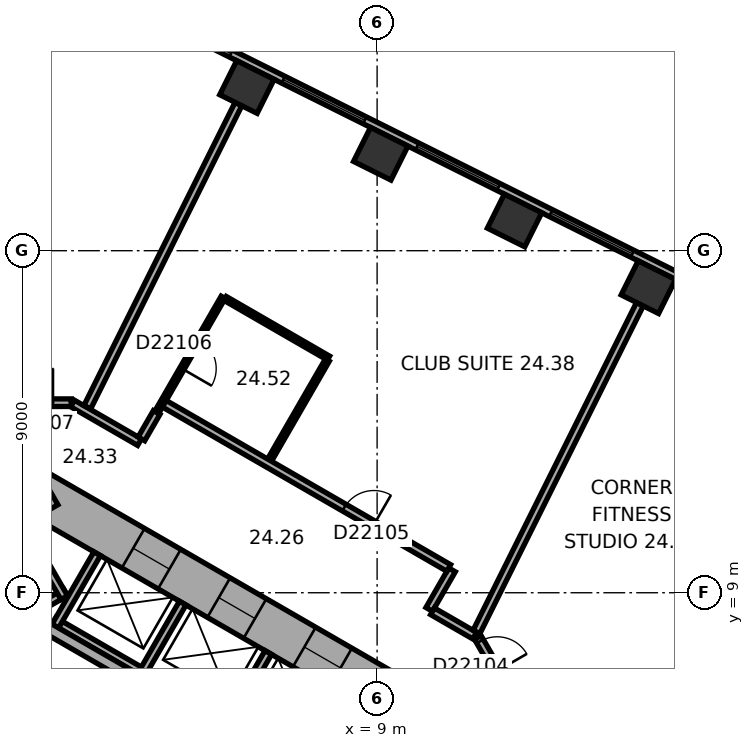
"""IFC4 building model, lengths in metres.
Left out: names, types, materials, properties, quantities, classifications, styles, units other than length and angle.
Written with IfcOpenShell. Run it as: python <this file> out.ifc"""

import sys

from ifc_helpers import new_model, si_unit, direction, frame, frame_2d, origin, origin_2d, place, context, subcontext, project, spatial, rectangle, extrude, element, fill, save


model = new_model("IFC4")
c1 = context("Model", 3, precision=1e-05, world=origin(), true_north=direction((0.0, 1.0)))
c2 = subcontext(c1, "Body", "Model", "MODEL_VIEW")
j1 = project(units=[si_unit("LENGTHUNIT", "METRE"), si_unit("PLANEANGLEUNIT", "RADIAN")], contexts=[c1])
p1 = place(None, origin())
s1 = spatial("IfcSite", under=j1, at=p1, CompositionType="ELEMENT")
p2 = place(p1, origin())
s2 = spatial("IfcBuilding", under=s1, at=p2, CompositionType="ELEMENT")
p3 = place(p2, frame((0.0, 0.0, 103.4)))
s3 = spatial("IfcBuildingStorey", under=s2, at=p3, CompositionType="ELEMENT", Elevation=103.4)
for number, where, z_axis, x_axis in (
    (1, (16.138, 17.04, 0.0), (0.0, 0.0, 1.0), (-0.895, 0.446, 0.0)),
    (2, (12.616, 18.795, 0.0), (0.0, 0.0, 1.0), (-0.895, 0.446, 0.0)),
    (3, (9.095, 20.551, 0.0), (0.0, 0.0, 1.0), (-0.895, 0.446, 0.0)),
    (4, (5.574, 22.306, 0.0), (0.0, 0.0, 1.0), (-0.895, 0.446, 0.0)),
):
    element("IfcColumn", number, at=place(p3, frame(where, z_axis=z_axis, x_axis=x_axis)), inside=s3, PredefinedType="COLUMN", context=c2, shape_type="SweptSolid", body=[
        extrude(rectangle(XDim=1.1, YDim=1.0, at=origin_2d()), origin(), (0.0, 0.0, 1.0), 3.3),
    ])
p4 = place(p3, frame((10.4, 5.658, 0.0), z_axis=(0.0, 0.0, 1.0), x_axis=(-0.866021384402, 0.500006961711, 0.0)))
e5 = element("IfcWall", 5, at=p4, inside=s3, PredefinedType="SHEAR", context=c2, shape_type="SweptSolid", body=[
    extrude(rectangle(XDim=12.355, YDim=1.2, at=frame_2d((6.178, 0.0))), origin(), (0.0, 0.0, 1.0), 3.3),
])
p5 = place(p4, frame((2.728, 0.0, 0.0)))
e6 = element("IfcOpeningElement", 6, at=p5, cuts=e5, PredefinedType="OPENING", context=c2, shape_type="SweptSolid", body=[
    extrude(rectangle(XDim=1.1, YDim=2.1, at=frame_2d((0.55, 1.05))), frame((0.0, 0.61, 0.0), z_axis=(0.0, -1.0, 0.0), x_axis=(1.0, 0.0, 0.0)), (0.0, 0.0, 1.0), 1.22),
])
p6 = place(p4, frame((5.328, 0.0, 0.0)))
e7 = element("IfcOpeningElement", 7, at=p6, cuts=e5, PredefinedType="OPENING", context=c2, shape_type="SweptSolid", body=[
    extrude(rectangle(XDim=1.1, YDim=2.1, at=frame_2d((0.55, 1.05))), frame((0.0, 0.61, 0.0), z_axis=(0.0, -1.0, 0.0), x_axis=(1.0, 0.0, 0.0)), (0.0, 0.0, 1.0), 1.22),
])
p7 = place(p4, frame((7.928, 0.0, 0.0)))
e8 = element("IfcOpeningElement", 8, at=p7, cuts=e5, PredefinedType="OPENING", context=c2, shape_type="SweptSolid", body=[
    extrude(rectangle(XDim=1.1, YDim=2.1, at=frame_2d((0.55, 1.05))), frame((0.0, 0.61, 0.0), z_axis=(0.0, -1.0, 0.0), x_axis=(1.0, 0.0, 0.0)), (0.0, 0.0, 1.0), 1.22),
])
p8 = place(p3, frame((0.3, 11.836, 0.0), z_axis=(0.0, 0.0, 1.0), x_axis=(-0.866021384402, -0.500006961711, 0.0)))
e9 = element("IfcWall", 9, at=p8, inside=s3, PredefinedType="SHEAR", context=c2, shape_type="SweptSolid", body=[
    extrude(rectangle(XDim=12.355, YDim=1.2, at=frame_2d((6.178, 0.0))), origin(), (0.0, 0.0, 1.0), 3.3),
])
p9 = place(p8, frame((6.378, 0.0, 0.0)))
e10 = element("IfcOpeningElement", 10, at=p9, cuts=e9, PredefinedType="OPENING", context=c2, shape_type="SweptSolid", body=[
    extrude(rectangle(XDim=1.5, YDim=2.1, at=frame_2d((0.75, 1.05))), frame((0.0, 0.61, 0.0), z_axis=(0.0, -1.0, 0.0), x_axis=(1.0, 0.0, 0.0)), (0.0, 0.0, 1.0), 1.22),
])
p10 = place(p8, frame((1.828, 0.0, 0.0)))
e11 = element("IfcOpeningElement", 11, at=p10, cuts=e9, PredefinedType="OPENING", context=c2, shape_type="SweptSolid", body=[
    extrude(rectangle(XDim=1.1, YDim=2.1, at=frame_2d((0.55, 1.05))), frame((0.0, 0.61, 0.0), z_axis=(0.0, -1.0, 0.0), x_axis=(1.0, 0.0, 0.0)), (0.0, 0.0, 1.0), 1.22),
])
p11 = place(p3, frame((20.63, 15.47, 0.0), z_axis=(0.0, 0.0, 1.0), x_axis=(-0.894934518609, 0.446197498203, 0.0)))
e12 = element("IfcWall", 12, at=p11, inside=s3, PredefinedType="STANDARD", context=c2, shape_type="SweptSolid", body=[
    extrude(rectangle(XDim=21.246, YDim=0.2, at=frame_2d((10.623, 0.0))), origin(), (0.0, 0.0, 1.0), 3.3),
])
p12 = place(p11, frame((1.553, 0.0, 0.8)))
e13 = element("IfcOpeningElement", 13, at=p12, cuts=e12, PredefinedType="OPENING", context=c2, shape_type="SweptSolid", body=[
    extrude(rectangle(XDim=2.4, YDim=1.7, at=frame_2d((1.2, 0.85))), frame((0.0, 0.11, 0.0), z_axis=(0.0, -1.0, 0.0), x_axis=(1.0, 0.0, 0.0)), (0.0, 0.0, 1.0), 0.22),
])
p13 = place(p11, frame((5.488, 0.0, 0.8)))
e14 = element("IfcOpeningElement", 14, at=p13, cuts=e12, PredefinedType="OPENING", context=c2, shape_type="SweptSolid", body=[
    extrude(rectangle(XDim=2.4, YDim=1.7, at=frame_2d((1.2, 0.85))), frame((0.0, 0.11, 0.0), z_axis=(0.0, -1.0, 0.0), x_axis=(1.0, 0.0, 0.0)), (0.0, 0.0, 1.0), 0.22),
])
p14 = place(p11, frame((9.422, 0.0, 0.8)))
e15 = element("IfcOpeningElement", 15, at=p14, cuts=e12, PredefinedType="OPENING", context=c2, shape_type="SweptSolid", body=[
    extrude(rectangle(XDim=2.4, YDim=1.7, at=frame_2d((1.2, 0.85))), frame((0.0, 0.11, 0.0), z_axis=(0.0, -1.0, 0.0), x_axis=(1.0, 0.0, 0.0)), (0.0, 0.0, 1.0), 0.22),
])
p15 = place(p11, frame((13.357, 0.0, 0.8)))
e16 = element("IfcOpeningElement", 16, at=p15, cuts=e12, PredefinedType="OPENING", context=c2, shape_type="SweptSolid", body=[
    extrude(rectangle(XDim=2.4, YDim=1.7, at=frame_2d((1.2, 0.85))), frame((0.0, 0.11, 0.0), z_axis=(0.0, -1.0, 0.0), x_axis=(1.0, 0.0, 0.0)), (0.0, 0.0, 1.0), 0.22),
])
p16 = place(p11, frame((17.292, 0.0, 0.8)))
e17 = element("IfcOpeningElement", 17, at=p16, cuts=e12, PredefinedType="OPENING", context=c2, shape_type="SweptSolid", body=[
    extrude(rectangle(XDim=2.4, YDim=1.7, at=frame_2d((1.2, 0.85))), frame((0.0, 0.11, 0.0), z_axis=(0.0, -1.0, 0.0), x_axis=(1.0, 0.0, 0.0)), (0.0, 0.0, 1.0), 0.22),
])
p17 = place(p3, frame((7.424, 4.259, 0.0), z_axis=(0.0, 0.0, 1.0), x_axis=(-0.866026010844, 0.49999894854, 0.0)))
e18 = element("IfcWall", 18, at=p17, inside=s3, PredefinedType="PARTITIONING", context=c2, shape_type="SweptSolid", body=[
    extrude(rectangle(XDim=8.0, YDim=0.2, at=frame_2d((4.0, 0.0))), origin(), (0.0, 0.0, 1.0), 3.05),
])
for number, where, z_axis, x_axis in (
    (19, (5.036, 5.522, 0.0), (0.0, 0.0, 1.0), (0.5, 0.866, 0.0)),
    (20, (2.784, 6.822, 0.0), (0.0, 0.0, 1.0), (0.5, 0.866, 0.0)),
    (21, (0.532, 8.122, 0.0), (0.0, 0.0, 1.0), (0.5, 0.866, 0.0)),
):
    element("IfcWall", number, at=place(p3, frame(where, z_axis=z_axis, x_axis=x_axis)), inside=s3, PredefinedType="PARTITIONING", context=c2, shape_type="SweptSolid", body=[
        extrude(rectangle(XDim=2.2, YDim=0.2, at=frame_2d((1.1, 0.0))), origin(), (0.0, 0.0, 1.0), 3.05),
    ])
p18 = place(p3, frame((0.803, 9.009, 0.0), z_axis=(0.0, 0.0, 1.0), x_axis=(-0.866028230842, -0.499995103361, 0.0)))
e22 = element("IfcWall", 22, at=p18, inside=s3, PredefinedType="PARTITIONING", context=c2, shape_type="SweptSolid", body=[
    extrude(rectangle(XDim=5.4, YDim=0.2, at=frame_2d((2.7, 0.0))), origin(), (0.0, 0.0, 1.0), 3.05),
])
p19 = place(p3, frame((0.767, 8.872, 0.0), z_axis=(0.0, 0.0, 1.0), x_axis=(-0.499994660107, 0.866028486751, 0.0)))
e23 = element("IfcWall", 23, at=p19, inside=s3, PredefinedType="PARTITIONING", context=c2, shape_type="SweptSolid", body=[
    extrude(rectangle(XDim=2.2, YDim=0.2, at=frame_2d((1.1, 0.0))), origin(), (0.0, 0.0, 1.0), 3.05),
])
p20 = place(p3, frame((6.303, 4.617, 0.0), z_axis=(0.0, 0.0, 1.0), x_axis=(-0.866027801685, 0.499995846692, 0.0)))
e24 = element("IfcWall", 24, at=p20, inside=s3, PredefinedType="SHEAR", context=c2, shape_type="SweptSolid", body=[
    extrude(rectangle(XDim=7.06, YDim=0.3, at=frame_2d((3.53, 0.0))), origin(), (0.0, 0.0, 1.0), 3.05),
])
p21 = place(p3, frame((0.95, 14.001, 0.0), z_axis=(0.0, 0.0, 1.0), x_axis=(-1.0, 0.0, 0.0)))
e25 = element("IfcWall", 25, at=p21, inside=s3, PredefinedType="PARTITIONING", context=c2, shape_type="SweptSolid", body=[
    extrude(rectangle(XDim=1.86, YDim=0.2, at=frame_2d((0.93, 0.0))), origin(), (0.0, 0.0, 1.0), 3.05),
])
p22 = place(p21, frame((0.48, 0.0, 0.0)))
e26 = element("IfcOpeningElement", 26, at=p22, cuts=e25, PredefinedType="OPENING", context=c2, shape_type="SweptSolid", body=[
    extrude(rectangle(XDim=0.9, YDim=2.1, at=frame_2d((0.45, 1.05))), frame((0.0, 0.11, 0.0), z_axis=(0.0, -1.0, 0.0), x_axis=(1.0, 0.0, 0.0)), (0.0, 0.0, 1.0), 0.22),
])
p23 = place(p3, frame((2.748, 12.962, 0.0), z_axis=(0.0, 0.0, 1.0), x_axis=(-0.866013897511, 0.50001992892, 0.0)))
e27 = element("IfcWall", 27, at=p23, inside=s3, PredefinedType="PARTITIONING", context=c2, shape_type="SweptSolid", body=[
    extrude(rectangle(XDim=2.037, YDim=0.2, at=frame_2d((1.018, 0.0))), origin(), (0.0, 0.0, 1.0), 3.05),
])
p24 = place(p3, frame((3.199, 13.743, 0.0), z_axis=(0.0, 0.0, 1.0), x_axis=(-0.500170954823, -0.865926680471, 0.0)))
e28 = element("IfcWall", 28, at=p24, inside=s3, PredefinedType="PARTITIONING", context=c2, shape_type="SweptSolid", body=[
    extrude(rectangle(XDim=0.801, YDim=0.2, at=frame_2d((0.4, 0.0))), origin(), (0.0, 0.0, 1.0), 3.05),
])
p25 = place(p3, frame((3.232, 13.8, 0.0), z_axis=(0.0, 0.0, 1.0), x_axis=(0.499993265928, 0.866029291668, 0.0)))
e29 = element("IfcWall", 29, at=p25, inside=s3, PredefinedType="PARTITIONING", context=c2, shape_type="SweptSolid", body=[
    extrude(rectangle(XDim=3.434, YDim=0.12, at=frame_2d((1.717, 0.0))), origin(), (0.0, 0.0, 1.0), 3.05),
])
p26 = place(p25, frame((1.267, 0.0, 0.0)))
e30 = element("IfcOpeningElement", 30, at=p26, cuts=e29, PredefinedType="OPENING", context=c2, shape_type="SweptSolid", body=[
    extrude(rectangle(XDim=0.9, YDim=2.1, at=frame_2d((0.45, 1.05))), frame((0.0, 0.07, 0.0), z_axis=(0.0, -1.0, 0.0), x_axis=(1.0, 0.0, 0.0)), (0.0, 0.0, 1.0), 0.14),
])
p27 = place(p3, frame((5.001, 16.744, 0.0), z_axis=(0.0, 0.0, 1.0), x_axis=(0.866009488468, -0.500027565123, 0.0)))
e31 = element("IfcWall", 31, at=p27, inside=s3, PredefinedType="PARTITIONING", context=c2, shape_type="SweptSolid", body=[
    extrude(rectangle(XDim=3.14, YDim=0.12, at=frame_2d((1.57, 0.0))), origin(), (0.0, 0.0, 1.0), 3.05),
])
p28 = place(p3, frame((5.351, 21.859, 0.0), z_axis=(0.0, 0.0, 1.0), x_axis=(-0.446205309328, -0.894930624086, 0.0)))
e32 = element("IfcWall", 32, at=p28, inside=s3, PredefinedType="PARTITIONING", context=c2, shape_type="SweptSolid", body=[
    extrude(rectangle(XDim=8.913, YDim=0.2, at=frame_2d((4.457, 0.0))), origin(), (0.0, 0.0, 1.0), 2.6),
])
p29 = place(p3, frame((7.69, 15.122, 0.0), z_axis=(0.0, 0.0, 1.0), x_axis=(-0.499991248344, -0.866030456496, 0.0)))
e33 = element("IfcWall", 33, at=p29, inside=s3, PredefinedType="PARTITIONING", context=c2, shape_type="SweptSolid", body=[
    extrude(rectangle(XDim=3.04, YDim=0.12, at=frame_2d((1.52, 0.0))), origin(), (0.0, 0.0, 1.0), 3.05),
])
p30 = place(p3, frame((10.371, 8.561, 0.0), z_axis=(0.0, 0.0, 1.0), x_axis=(0.499986357472, 0.866033280158, 0.0)))
e34 = element("IfcWall", 34, at=p30, inside=s3, PredefinedType="PARTITIONING", context=c2, shape_type="SweptSolid", body=[
    extrude(rectangle(XDim=1.201, YDim=0.2, at=frame_2d((0.601, 0.0))), origin(), (0.0, 0.0, 1.0), 3.05),
])
p31 = place(p3, frame((10.885, 9.652, 0.0), z_axis=(0.0, 0.0, 1.0), x_axis=(-0.866033630405, 0.499985750804, 0.0)))
e35 = element("IfcWall", 35, at=p31, inside=s3, PredefinedType="PARTITIONING", context=c2, shape_type="SweptSolid", body=[
    extrude(rectangle(XDim=8.642, YDim=0.2, at=frame_2d((4.321, 0.0))), origin(), (0.0, 0.0, 1.0), 3.05),
])
p32 = place(p31, frame((2.276, 0.0, 0.0)))
e36 = element("IfcOpeningElement", 36, at=p32, cuts=e35, PredefinedType="OPENING", context=c2, shape_type="SweptSolid", body=[
    extrude(rectangle(XDim=0.9, YDim=2.1, at=frame_2d((0.45, 1.05))), frame((0.0, 0.11, 0.0), z_axis=(0.0, -1.0, 0.0), x_axis=(1.0, 0.0, 0.0)), (0.0, 0.0, 1.0), 0.22),
])
p33 = place(p3, frame((11.566, 7.871, 0.0), z_axis=(0.0, 0.0, 1.0), x_axis=(-0.866004557827, 0.500036104519, 0.0)))
e37 = element("IfcWall", 37, at=p33, inside=s3, PredefinedType="PARTITIONING", context=c2, shape_type="SweptSolid", body=[
    extrude(rectangle(XDim=1.28, YDim=0.2, at=frame_2d((0.64, 0.0))), origin(), (0.0, 0.0, 1.0), 3.05),
])
p34 = place(p3, frame((12.58, 6.212, 0.0), z_axis=(0.0, 0.0, 1.0), x_axis=(-0.500063286585, 0.865988862174, 0.0)))
e38 = element("IfcWall", 38, at=p34, inside=s3, PredefinedType="PARTITIONING", context=c2, shape_type="SweptSolid", body=[
    extrude(rectangle(XDim=1.86, YDim=0.2, at=frame_2d((0.93, 0.0))), origin(), (0.0, 0.0, 1.0), 3.05),
])
p35 = place(p34, frame((0.842, 0.0, 0.0)))
e39 = element("IfcOpeningElement", 39, at=p35, cuts=e38, PredefinedType="OPENING", context=c2, shape_type="SweptSolid", body=[
    extrude(rectangle(XDim=0.9, YDim=2.1, at=frame_2d((0.45, 1.05))), frame((0.0, 0.11, 0.0), z_axis=(0.0, -1.0, 0.0), x_axis=(1.0, 0.0, 0.0)), (0.0, 0.0, 1.0), 0.22),
])
p36 = place(p3, frame((15.915, 16.592, 0.0), z_axis=(0.0, 0.0, 1.0), x_axis=(-0.446199736347, -0.894933402709, 0.0)))
e40 = element("IfcWall", 40, at=p36, inside=s3, PredefinedType="PARTITIONING", context=c2, shape_type="SweptSolid", body=[
    extrude(rectangle(XDim=9.635, YDim=0.2, at=frame_2d((4.817, 0.0))), origin(), (0.0, 0.0, 1.0), 3.05),
])
p37 = place(p13, origin())
e41 = element("IfcWindow", 41, at=p37, inside=s3, PartitioningType="SINGLE_PANEL", PredefinedType="WINDOW", context=c2, shape_type="SweptSolid", body=[
    extrude(rectangle(XDim=2.4, YDim=1.7, at=frame_2d((1.2, 0.85))), frame((0.0, 0.03, 0.0), z_axis=(0.0, -1.0, 0.0), x_axis=(1.0, 0.0, 0.0)), (0.0, 0.0, 1.0), 0.06),
])
fill(e14, e41)
p38 = place(p14, origin())
e42 = element("IfcWindow", 42, at=p38, inside=s3, PartitioningType="SINGLE_PANEL", PredefinedType="WINDOW", context=c2, shape_type="SweptSolid", body=[
    extrude(rectangle(XDim=2.4, YDim=1.7, at=frame_2d((1.2, 0.85))), frame((0.0, 0.03, 0.0), z_axis=(0.0, -1.0, 0.0), x_axis=(1.0, 0.0, 0.0)), (0.0, 0.0, 1.0), 0.06),
])
fill(e15, e42)
p39 = place(p15, origin())
e43 = element("IfcWindow", 43, at=p39, inside=s3, PartitioningType="SINGLE_PANEL", PredefinedType="WINDOW", context=c2, shape_type="SweptSolid", body=[
    extrude(rectangle(XDim=2.4, YDim=1.7, at=frame_2d((1.2, 0.85))), frame((0.0, 0.03, 0.0), z_axis=(0.0, -1.0, 0.0), x_axis=(1.0, 0.0, 0.0)), (0.0, 0.0, 1.0), 0.06),
])
fill(e16, e43)
p40 = place(p16, origin())
e44 = element("IfcWindow", 44, at=p40, inside=s3, PartitioningType="SINGLE_PANEL", PredefinedType="WINDOW", context=c2, shape_type="SweptSolid", body=[
    extrude(rectangle(XDim=2.4, YDim=1.7, at=frame_2d((1.2, 0.85))), frame((0.0, 0.03, 0.0), z_axis=(0.0, -1.0, 0.0), x_axis=(1.0, 0.0, 0.0)), (0.0, 0.0, 1.0), 0.06),
])
fill(e17, e44)
p41 = place(p5, origin())
e45 = element("IfcDoor", 45, at=p41, inside=s3, OperationType="DOUBLE_DOOR_SLIDING", PredefinedType="DOOR", context=c2, shape_type="SweptSolid", body=[
    extrude(rectangle(XDim=1.1, YDim=2.1, at=frame_2d((0.55, 1.05))), frame((0.0, 0.025, 0.0), z_axis=(0.0, -1.0, 0.0), x_axis=(1.0, 0.0, 0.0)), (0.0, 0.0, 1.0), 0.05),
])
fill(e6, e45)
p42 = place(p6, origin())
e46 = element("IfcDoor", 46, at=p42, inside=s3, OperationType="DOUBLE_DOOR_SLIDING", PredefinedType="DOOR", context=c2, shape_type="SweptSolid", body=[
    extrude(rectangle(XDim=1.1, YDim=2.1, at=frame_2d((0.55, 1.05))), frame((0.0, 0.025, 0.0), z_axis=(0.0, -1.0, 0.0), x_axis=(1.0, 0.0, 0.0)), (0.0, 0.0, 1.0), 0.05),
])
fill(e7, e46)
p43 = place(p7, origin())
e47 = element("IfcDoor", 47, at=p43, inside=s3, OperationType="DOUBLE_DOOR_SLIDING", PredefinedType="DOOR", context=c2, shape_type="SweptSolid", body=[
    extrude(rectangle(XDim=1.1, YDim=2.1, at=frame_2d((0.55, 1.05))), frame((0.0, 0.025, 0.0), z_axis=(0.0, -1.0, 0.0), x_axis=(1.0, 0.0, 0.0)), (0.0, 0.0, 1.0), 0.05),
])
fill(e8, e47)
p44 = place(p35, origin())
e48 = element("IfcDoor", 48, at=p44, inside=s3, OperationType="SINGLE_SWING_LEFT", PredefinedType="DOOR", context=c2, shape_type="SweptSolid", body=[
    extrude(rectangle(XDim=0.9, YDim=2.1, at=frame_2d((0.45, 1.05))), frame((0.0, 0.025, 0.0), z_axis=(0.0, -1.0, 0.0), x_axis=(1.0, 0.0, 0.0)), (0.0, 0.0, 1.0), 0.05),
])
fill(e39, e48)
p45 = place(p32, origin())
e49 = element("IfcDoor", 49, at=p45, inside=s3, OperationType="SINGLE_SWING_LEFT", PredefinedType="DOOR", context=c2, shape_type="SweptSolid", body=[
    extrude(rectangle(XDim=0.9, YDim=2.1, at=frame_2d((0.45, 1.05))), frame((0.0, 0.025, 0.0), z_axis=(0.0, -1.0, 0.0), x_axis=(1.0, 0.0, 0.0)), (0.0, 0.0, 1.0), 0.05),
])
fill(e36, e49)
p46 = place(p26, origin())
e50 = element("IfcDoor", 50, at=p46, inside=s3, OperationType="SINGLE_SWING_LEFT", PredefinedType="DOOR", context=c2, shape_type="SweptSolid", body=[
    extrude(rectangle(XDim=0.9, YDim=2.1, at=frame_2d((0.45, 1.05))), frame((0.0, 0.025, 0.0), z_axis=(0.0, -1.0, 0.0), x_axis=(1.0, 0.0, 0.0)), (0.0, 0.0, 1.0), 0.05),
])
fill(e30, e50)
p47 = place(p22, origin())
e51 = element("IfcDoor", 51, at=p47, inside=s3, OperationType="SINGLE_SWING_LEFT", PredefinedType="DOOR", context=c2, shape_type="SweptSolid", body=[
    extrude(rectangle(XDim=0.9, YDim=2.1, at=frame_2d((0.45, 1.05))), frame((0.0, 0.025, 0.0), z_axis=(0.0, -1.0, 0.0), x_axis=(1.0, 0.0, 0.0)), (0.0, 0.0, 1.0), 0.05),
])
fill(e26, e51)
save(model, sys.argv[1])
